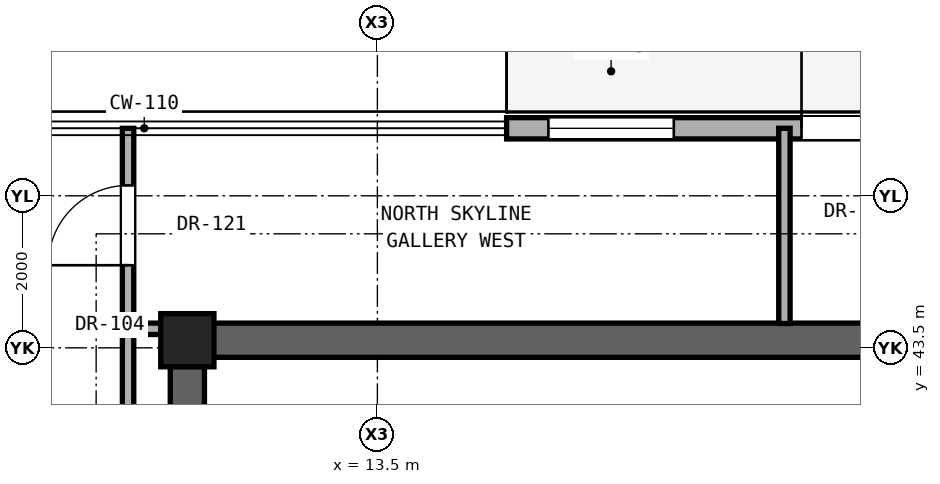
"""IFC4 building model, lengths in metres.
Left out: names, types, materials, properties, quantities, classifications, styles, units other than length and angle.
Written with IfcOpenShell. Run it as: python <this file> out.ifc"""

import sys

from ifc_helpers import new_model, si_unit, direction, frame, frame_2d, origin, origin_2d, place, context, subcontext, project, spatial, rectangle, extrude, element, fill, save


model = new_model("IFC4")
c1 = context("Model", 3, precision=1e-05, world=origin(), true_north=direction((0.0, 1.0)))
c2 = subcontext(c1, "Body", "Model", "MODEL_VIEW")
j1 = project(units=[si_unit("LENGTHUNIT", "METRE"), si_unit("PLANEANGLEUNIT", "RADIAN")], contexts=[c1])
p1 = place(None, origin())
s1 = spatial("IfcSite", under=j1, at=p1, CompositionType="ELEMENT")
p2 = place(p1, origin())
s2 = spatial("IfcBuilding", under=s1, at=p2, CompositionType="ELEMENT")
p3 = place(p2, frame((0.0, 0.0, 252.7)))
s3 = spatial("IfcBuildingStorey", under=s2, at=p3, CompositionType="ELEMENT", Elevation=252.7)
p4 = place(p3, frame((11.0, 43.6, 0.0), z_axis=(0.0, 0.0, 1.0), x_axis=(1.0, 0.0, 0.0)))
e1 = element("IfcColumn", 1, at=p4, inside=s3, PredefinedType="COLUMN", context=c2, shape_type="SweptSolid", body=[
    extrude(rectangle(XDim=0.7, YDim=0.7, at=origin_2d()), origin(), (0.0, 0.0, 1.0), 3.6),
])
p5 = place(p3, frame((11.0, 43.6, 0.0), z_axis=(0.0, 0.0, 1.0), x_axis=(1.0, 0.0, 0.0)))
e2 = element("IfcWall", 2, at=p5, inside=s3, PredefinedType="SHEAR", context=c2, shape_type="SweptSolid", body=[
    extrude(rectangle(XDim=19.0, YDim=0.45, at=frame_2d((9.5, 0.0))), origin(), (0.0, 0.0, 1.0), 3.4),
])
p6 = place(p3, frame((11.0, 37.6, 0.0), z_axis=(0.0, 0.0, 1.0), x_axis=(0.0, 1.0, 0.0)))
e3 = element("IfcWall", 3, at=p6, inside=s3, PredefinedType="SHEAR", context=c2, shape_type="SweptSolid", body=[
    extrude(rectangle(XDim=6.0, YDim=0.45, at=frame_2d((3.0, 0.0))), origin(), (0.0, 0.0, 1.0), 3.4),
])
p7 = place(p3, frame((15.2, 46.388, 0.0), z_axis=(0.0, 0.0, 1.0), x_axis=(1.0, 0.0, 0.0)))
e4 = element("IfcWall", 4, at=p7, inside=s3, PredefinedType="SOLIDWALL", context=c2, shape_type="SweptSolid", body=[
    extrude(rectangle(XDim=10.6, YDim=0.28, at=frame_2d((5.3, 0.0))), origin(), (0.0, 0.0, 1.0), 3.36),
])
p8 = place(p7, frame((0.55, 0.0, 0.85)))
e5 = element("IfcOpeningElement", 5, at=p8, cuts=e4, PredefinedType="OPENING", context=c2, shape_type="SweptSolid", body=[
    extrude(rectangle(XDim=1.65, YDim=2.2, at=frame_2d((0.825, 1.1))), frame((0.0, 0.15, 0.0), z_axis=(0.0, -1.0, 0.0), x_axis=(1.0, 0.0, 0.0)), (0.0, 0.0, 1.0), 0.3),
])
p9 = place(p7, frame((3.88, 0.0, 0.0)))
e6 = element("IfcOpeningElement", 6, at=p9, cuts=e4, PredefinedType="OPENING", context=c2, shape_type="SweptSolid", body=[
    extrude(rectangle(XDim=1.5, YDim=2.3, at=frame_2d((0.75, 1.15))), frame((0.0, 0.15, 0.0), z_axis=(0.0, -1.0, 0.0), x_axis=(1.0, 0.0, 0.0)), (0.0, 0.0, 1.0), 0.3),
])
p10 = place(p3, frame((10.22, 43.75, 0.0), z_axis=(0.0, 0.0, 1.0), x_axis=(1.0, 0.0, 0.0)))
e7 = element("IfcWall", 7, at=p10, inside=s3, PredefinedType="PARTITIONING", context=c2, shape_type="SweptSolid", body=[
    extrude(rectangle(XDim=0.56, YDim=0.15, at=frame_2d((0.28, 0.0))), origin(), (0.0, 0.0, 1.0), 3.4),
])
p11 = place(p3, frame((10.22, 34.535, 0.0), z_axis=(0.0, 0.0, 1.0), x_axis=(0.0, 1.0, 0.0)))
e8 = element("IfcWall", 8, at=p11, inside=s3, PredefinedType="PARTITIONING", context=c2, shape_type="SweptSolid", body=[
    extrude(rectangle(XDim=9.13, YDim=0.15, at=frame_2d((4.565, 0.0))), origin(), (0.0, 0.0, 1.0), 2.792),
])
p12 = place(p3, frame((10.22, 43.835, 0.0), z_axis=(0.0, 0.0, 1.0), x_axis=(0.0, 1.0, 0.0)))
e9 = element("IfcWall", 9, at=p12, inside=s3, PredefinedType="PARTITIONING", context=c2, shape_type="SweptSolid", body=[
    extrude(rectangle(XDim=2.553, YDim=0.15, at=frame_2d((1.276, 0.0))), origin(), (0.0, 0.0, 1.0), 3.4),
])
p13 = place(p12, frame((0.751, 0.0, 0.0)))
e10 = element("IfcOpeningElement", 10, at=p13, cuts=e9, PredefinedType="OPENING", context=c2, shape_type="SweptSolid", body=[
    extrude(rectangle(XDim=1.05, YDim=2.2, at=frame_2d((0.525, 1.1))), frame((0.0, 0.085, 0.0), z_axis=(0.0, -1.0, 0.0), x_axis=(1.0, 0.0, 0.0)), (0.0, 0.0, 1.0), 0.17),
])
p14 = place(p3, frame((18.855, 43.82, 0.0), z_axis=(0.0, 0.0, 1.0), x_axis=(0.0, 1.0, 0.0)))
e11 = element("IfcWall", 11, at=p14, inside=s3, PredefinedType="PARTITIONING", context=c2, shape_type="SweptSolid", body=[
    extrude(rectangle(XDim=2.568, YDim=0.15, at=frame_2d((1.284, 0.0))), origin(), (0.0, 0.0, 1.0), 3.4),
])
p15 = place(p8, origin())
e12 = element("IfcWindow", 12, at=p15, inside=s3, PartitioningType="SINGLE_PANEL", PredefinedType="WINDOW", context=c2, shape_type="SweptSolid", body=[
    extrude(rectangle(XDim=1.65, YDim=2.2, at=frame_2d((0.825, 1.1))), frame((0.0, 0.03, 0.0), z_axis=(0.0, -1.0, 0.0), x_axis=(1.0, 0.0, 0.0)), (0.0, 0.0, 1.0), 0.06),
])
fill(e5, e12)
p16 = place(p9, origin())
e13 = element("IfcDoor", 13, at=p16, inside=s3, OperationType="SINGLE_SWING_LEFT", PredefinedType="DOOR", context=c2, shape_type="SweptSolid", body=[
    extrude(rectangle(XDim=1.5, YDim=2.3, at=frame_2d((0.75, 1.15))), frame((0.0, 0.025, 0.0), z_axis=(0.0, -1.0, 0.0), x_axis=(1.0, 0.0, 0.0)), (0.0, 0.0, 1.0), 0.05),
])
fill(e6, e13)
p17 = place(p13, origin())
e14 = element("IfcDoor", 14, at=p17, inside=s3, OperationType="SINGLE_SWING_LEFT", PredefinedType="DOOR", context=c2, shape_type="SweptSolid", body=[
    extrude(rectangle(XDim=1.05, YDim=2.2, at=frame_2d((0.525, 1.1))), frame((0.0, 0.025, 0.0), z_axis=(0.0, -1.0, 0.0), x_axis=(1.0, 0.0, 0.0)), (0.0, 0.0, 1.0), 0.05),
])
fill(e10, e14)
save(model, sys.argv[1])
